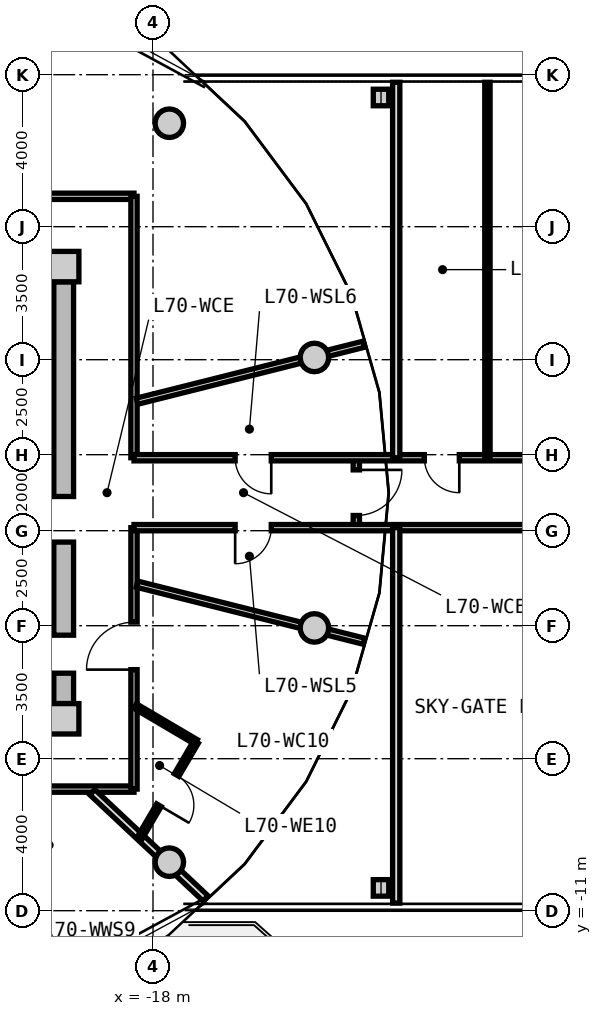
"""IFC4 building model, lengths in metres.
Left out: names, types, materials, properties, quantities, classifications, styles, units other than length and angle.
Written with IfcOpenShell. Run it as: python <this file> out.ifc"""

import sys

from ifc_helpers import new_model, si_unit, direction, frame, frame_2d, origin, origin_2d, place, context, subcontext, project, spatial, rectangle, circle, i_section, extrude, source, transform, mapped, element, fill, save


model = new_model("IFC4")
c1 = context("Model", 3, precision=1e-05, world=origin(), true_north=direction((0.0, 1.0)))
c2 = subcontext(c1, "Body", "Model", "MODEL_VIEW")
j1 = project(units=[si_unit("LENGTHUNIT", "METRE"), si_unit("PLANEANGLEUNIT", "RADIAN")], contexts=[c1])
p1 = place(None, origin())
s1 = spatial("IfcSite", under=j1, at=p1, CompositionType="ELEMENT")
p2 = place(p1, origin())
s2 = spatial("IfcBuilding", under=s1, at=p2, CompositionType="ELEMENT")
p3 = place(p2, frame((0.0, 0.0, 226.1)))
s3 = spatial("IfcBuildingStorey", under=s2, at=p3, CompositionType="ELEMENT", Elevation=226.1)
m1 = source(origin(), c2, "Body", "SweptSolid", [
    extrude(rectangle(XDim=0.8, YDim=0.8, at=origin_2d()), origin(), (0.0, 0.0, 1.0), 3.05),
])
for number, where, z_axis, x_axis in (
    (1, (-20.35, -5.95, 0.0), (0.0, 0.0, 1.0), (1.0, 0.0, 0.0)),
    (2, (-20.35, 5.95, 0.0), (0.0, 0.0, 1.0), (1.0, 0.0, 0.0)),
):
    element("IfcColumn", number, at=place(p3, frame(where, z_axis=z_axis, x_axis=x_axis)), inside=s3, PredefinedType="COLUMN", context=c2, shape_type="MappedRepresentation", body=[
        mapped(m1, transform((0.0, 0.0, 0.0), x_axis=(1.0, 0.0, 0.0), y_axis=(0.0, 1.0, 0.0), z_axis=(0.0, 0.0, 1.0), scale=1.0)),
    ])
m2 = source(origin(), c2, "Body", "SweptSolid", [
    extrude(rectangle(XDim=11.1, YDim=0.52, at=frame_2d((5.55, 0.0))), origin(), (0.0, 0.0, 1.0), 2.76),
])
p4 = place(p3, frame((-20.35, 5.55, 0.0), z_axis=(0.0, 0.0, 1.0), x_axis=(0.0, -1.0, 0.0)))
e3 = element("IfcWall", 3, at=p4, inside=s3, PredefinedType="SHEAR", context=c2, shape_type="MappedRepresentation", body=[
    mapped(m2, transform((0.0, 0.0, 0.0), x_axis=(1.0, 0.0, 0.0), y_axis=(0.0, 1.0, 0.0), z_axis=(0.0, 0.0, 1.0), scale=1.0)),
])
p5 = place(p4, frame((5.65, 0.0, 0.0)))
e4 = element("IfcOpeningElement", 4, at=p5, cuts=e3, PredefinedType="OPENING", context=c2, shape_type="SweptSolid", body=[
    extrude(rectangle(XDim=1.2, YDim=2.15, at=frame_2d((0.6, 1.075))), frame((0.0, 0.27, 0.0), z_axis=(0.0, -1.0, 0.0), x_axis=(1.0, 0.0, 0.0)), (0.0, 0.0, 1.0), 0.54),
])
p6 = place(p4, frame((9.3, 0.0, 0.0)))
e5 = element("IfcOpeningElement", 5, at=p6, cuts=e3, PredefinedType="OPENING", context=c2, shape_type="SweptSolid", body=[
    extrude(rectangle(XDim=1.0, YDim=2.1, at=frame_2d((0.5, 1.05))), frame((0.0, 0.27, 0.0), z_axis=(0.0, -1.0, 0.0), x_axis=(1.0, 0.0, 0.0)), (0.0, 0.0, 1.0), 0.54),
])
m3 = source(origin(), c2, "Body", "SweptSolid", [
    extrude(circle(Radius=0.375, at=origin_2d()), origin(), (0.0, 0.0, 1.0), 3.05),
])
for number, where, z_axis, x_axis in (
    (6, (-13.753, 3.559, 0.0), (0.0, 0.0, 1.0), (1.0, 0.0, 0.0)),
    (7, (-17.57, 9.723, 0.0), (0.0, 0.0, 1.0), (1.0, 0.0, 0.0)),
    (8, (-17.57, -9.723, 0.0), (0.0, 0.0, 1.0), (1.0, 0.0, 0.0)),
    (9, (-13.753, -3.559, 0.0), (0.0, 0.0, 1.0), (1.0, 0.0, 0.0)),
):
    element("IfcColumn", number, at=place(p3, frame(where, z_axis=z_axis, x_axis=x_axis)), inside=s3, PredefinedType="COLUMN", context=c2, shape_type="MappedRepresentation", body=[
        mapped(m3, transform((0.0, 0.0, 0.0), x_axis=(1.0, 0.0, 0.0), y_axis=(0.0, 1.0, 0.0), z_axis=(0.0, 0.0, 1.0), scale=1.0)),
    ])
m4 = source(origin(), c2, "Body", "SweptSolid", [
    extrude(i_section(OverallWidth=0.407, OverallDepth=0.435, WebThickness=0.024, FlangeThickness=0.039, FilletRadius=0.015, at=origin_2d()), origin(), (0.0, 0.0, 1.0), 3.05),
])
for number, where, z_axis, x_axis in (
    (10, (-12.0, -10.4, 0.0), (0.0, 0.0, 1.0), (1.0, 0.0, 0.0)),
    (11, (-12.0, 10.4, 0.0), (0.0, 0.0, 1.0), (1.0, 0.0, 0.0)),
):
    element("IfcColumn", number, at=place(p3, frame(where, z_axis=z_axis, x_axis=x_axis)), inside=s3, PredefinedType="COLUMN", context=c2, shape_type="MappedRepresentation", body=[
        mapped(m4, transform((0.0, 0.0, 0.0), x_axis=(1.0, 0.0, 0.0), y_axis=(0.0, 1.0, 0.0), z_axis=(0.0, 0.0, 1.0), scale=1.0)),
    ])
m5 = source(origin(), c2, "Body", "SweptSolid", [
    extrude(rectangle(XDim=8.58, YDim=0.165, at=frame_2d((4.29, 0.0))), origin(), (0.0, 0.0, 1.0), 2.745),
])
p7 = place(p3, frame((-27.08, 7.8, 0.0), z_axis=(0.0, 0.0, 1.0), x_axis=(1.0, 0.0, 0.0)))
e12 = element("IfcWall", 12, at=p7, inside=s3, PredefinedType="PARTITIONING", context=c2, shape_type="MappedRepresentation", body=[
    mapped(m5, transform((0.0, 0.0, 0.0), x_axis=(1.0, 0.0, 0.0), y_axis=(0.0, 1.0, 0.0), z_axis=(0.0, 0.0, 1.0), scale=1.0)),
])
p8 = place(p7, frame((4.22, 0.0, 0.0)))
e13 = element("IfcOpeningElement", 13, at=p8, cuts=e12, PredefinedType="OPENING", context=c2, shape_type="SweptSolid", body=[
    extrude(rectangle(XDim=1.25, YDim=2.2, at=frame_2d((0.625, 1.1))), frame((0.0, 0.093, 0.0), z_axis=(0.0, -1.0, 0.0), x_axis=(1.0, 0.0, 0.0)), (0.0, 0.0, 1.0), 0.185),
])
m6 = source(origin(), c2, "Body", "SweptSolid", [
    extrude(rectangle(XDim=19.0, YDim=0.165, at=frame_2d((9.5, 0.0))), origin(), (0.0, 0.0, 1.0), 2.745),
])
p9 = place(p3, frame((-18.5, -7.8, 0.0), z_axis=(0.0, 0.0, 1.0), x_axis=(-1.0, 0.0, 0.0)))
e14 = element("IfcWall", 14, at=p9, inside=s3, PredefinedType="PARTITIONING", context=c2, shape_type="MappedRepresentation", body=[
    mapped(m6, transform((0.0, 0.0, 0.0), x_axis=(1.0, 0.0, 0.0), y_axis=(0.0, 1.0, 0.0), z_axis=(0.0, 0.0, 1.0), scale=1.0)),
])
p10 = place(p9, frame((12.373, 0.0, 0.0)))
e15 = element("IfcOpeningElement", 15, at=p10, cuts=e14, PredefinedType="OPENING", context=c2, shape_type="SweptSolid", body=[
    extrude(rectangle(XDim=1.25, YDim=2.2, at=frame_2d((0.625, 1.1))), frame((0.0, 0.093, 0.0), z_axis=(0.0, -1.0, 0.0), x_axis=(1.0, 0.0, 0.0)), (0.0, 0.0, 1.0), 0.185),
])
p11 = place(p9, frame((5.946, 0.0, 0.0)))
e16 = element("IfcOpeningElement", 16, at=p11, cuts=e14, PredefinedType="OPENING", context=c2, shape_type="SweptSolid", body=[
    extrude(rectangle(XDim=0.92, YDim=2.1, at=frame_2d((0.46, 1.05))), frame((0.0, 0.093, 0.0), z_axis=(0.0, -1.0, 0.0), x_axis=(1.0, 0.0, 0.0)), (0.0, 0.0, 1.0), 0.185),
])
p12 = place(p9, frame((2.83, 0.0, 0.0)))
e17 = element("IfcOpeningElement", 17, at=p12, cuts=e14, PredefinedType="OPENING", context=c2, shape_type="SweptSolid", body=[
    extrude(rectangle(XDim=0.92, YDim=2.1, at=frame_2d((0.46, 1.05))), frame((0.0, 0.093, 0.0), z_axis=(0.0, -1.0, 0.0), x_axis=(1.0, 0.0, 0.0)), (0.0, 0.0, 1.0), 0.185),
])
m7 = source(origin(), c2, "Body", "SweptSolid", [
    extrude(rectangle(XDim=6.88, YDim=0.165, at=frame_2d((3.44, 0.0))), origin(), (0.0, 0.0, 1.0), 2.745),
])
p13 = place(p3, frame((-18.5, 7.8, 0.0), z_axis=(0.0, 0.0, 1.0), x_axis=(0.0, -1.0, 0.0)))
e18 = element("IfcWall", 18, at=p13, inside=s3, PredefinedType="PARTITIONING", context=c2, shape_type="MappedRepresentation", body=[
    mapped(m7, transform((0.0, 0.0, 0.0), x_axis=(1.0, 0.0, 0.0), y_axis=(0.0, 1.0, 0.0), z_axis=(0.0, 0.0, 1.0), scale=1.0)),
])
p14 = place(p3, frame((-18.5, -0.92, 0.0), z_axis=(0.0, 0.0, 1.0), x_axis=(0.0, -1.0, 0.0)))
e19 = element("IfcWall", 19, at=p14, inside=s3, PredefinedType="PARTITIONING", context=c2, shape_type="MappedRepresentation", body=[
    mapped(m7, transform((0.0, 0.0, 0.0), x_axis=(1.0, 0.0, 0.0), y_axis=(0.0, 1.0, 0.0), z_axis=(0.0, 0.0, 1.0), scale=1.0)),
])
p15 = place(p14, frame((2.486, 0.0, 0.0)))
e20 = element("IfcOpeningElement", 20, at=p15, cuts=e19, PredefinedType="OPENING", context=c2, shape_type="SweptSolid", body=[
    extrude(rectangle(XDim=1.25, YDim=2.2, at=frame_2d((0.625, 1.1))), frame((0.0, 0.093, 0.0), z_axis=(0.0, -1.0, 0.0), x_axis=(1.0, 0.0, 0.0)), (0.0, 0.0, 1.0), 0.185),
])
m8 = source(origin(), c2, "Body", "SweptSolid", [
    extrude(rectangle(XDim=6.157, YDim=0.165, at=frame_2d((3.079, 0.0))), origin(), (0.0, 0.0, 1.0), 2.345),
])
for number, where, z_axis, x_axis in (
    (21, (-18.42, -2.407, 0.0), (0.0, 0.0, 1.0), (0.97, -0.244, 0.0)),
    (22, (-18.42, 2.407, 0.0), (0.0, 0.0, 1.0), (0.97, 0.244, 0.0)),
):
    element("IfcWall", number, at=place(p3, frame(where, z_axis=z_axis, x_axis=x_axis)), inside=s3, PredefinedType="PARTITIONING", context=c2, shape_type="MappedRepresentation", body=[
        mapped(m8, transform((0.0, 0.0, 0.0), x_axis=(1.0, 0.0, 0.0), y_axis=(0.0, 1.0, 0.0), z_axis=(0.0, 0.0, 1.0), scale=1.0)),
    ])
m9 = source(origin(), c2, "Body", "SweptSolid", [
    extrude(rectangle(XDim=4.089, YDim=0.19, at=frame_2d((2.044, 0.0))), origin(), (0.0, 0.0, 1.0), 2.345),
])
p16 = place(p3, frame((-19.598, -7.88, 0.0), z_axis=(0.0, 0.0, 1.0), x_axis=(0.729401273609, -0.684086092577, 0.0)))
e23 = element("IfcWall", 23, at=p16, inside=s3, PredefinedType="PARTITIONING", context=c2, shape_type="MappedRepresentation", body=[
    mapped(m9, transform((0.0, 0.0, 0.0), x_axis=(1.0, 0.0, 0.0), y_axis=(0.0, 1.0, 0.0), z_axis=(0.0, 0.0, 1.0), scale=1.0)),
])
m10 = source(origin(), c2, "Body", "SweptSolid", [
    extrude(rectangle(XDim=1.859, YDim=0.14, at=frame_2d((0.93, 0.0))), origin(), (0.0, 0.0, 1.0), 2.745),
])
p17 = place(p3, frame((-18.47, -5.615, 0.0), z_axis=(0.0, 0.0, 1.0), x_axis=(0.861555897139, -0.507662718845, 0.0)))
e24 = element("IfcWall", 24, at=p17, inside=s3, PredefinedType="PARTITIONING", context=c2, shape_type="MappedRepresentation", body=[
    mapped(m10, transform((0.0, 0.0, 0.0), x_axis=(1.0, 0.0, 0.0), y_axis=(0.0, 1.0, 0.0), z_axis=(0.0, 0.0, 1.0), scale=1.0)),
])
m11 = source(origin(), c2, "Body", "SweptSolid", [
    extrude(rectangle(XDim=2.939, YDim=0.14, at=frame_2d((1.47, 0.0))), origin(), (0.0, 0.0, 1.0), 2.745),
])
p18 = place(p3, frame((-16.868, -6.559, 0.0), z_axis=(0.0, 0.0, 1.0), x_axis=(-0.505883614636, -0.862601743821, 0.0)))
e25 = element("IfcWall", 25, at=p18, inside=s3, PredefinedType="PARTITIONING", context=c2, shape_type="MappedRepresentation", body=[
    mapped(m11, transform((0.0, 0.0, 0.0), x_axis=(1.0, 0.0, 0.0), y_axis=(0.0, 1.0, 0.0), z_axis=(0.0, 0.0, 1.0), scale=1.0)),
])
p19 = place(p18, frame((1.01, 0.0, 0.0)))
e26 = element("IfcOpeningElement", 26, at=p19, cuts=e25, PredefinedType="OPENING", context=c2, shape_type="SweptSolid", body=[
    extrude(rectangle(XDim=0.92, YDim=2.1, at=frame_2d((0.46, 1.05))), frame((0.0, 0.08, 0.0), z_axis=(0.0, -1.0, 0.0), x_axis=(1.0, 0.0, 0.0)), (0.0, 0.0, 1.0), 0.16),
])
m12 = source(origin(), c2, "Body", "SweptSolid", [
    extrude(rectangle(XDim=1.84, YDim=0.165, at=frame_2d((0.92, 0.0))), origin(), (0.0, 0.0, 1.0), 2.745),
])
p20 = place(p3, frame((-12.65, -0.92, 0.0), z_axis=(0.0, 0.0, 1.0), x_axis=(0.0, 1.0, 0.0)))
e27 = element("IfcWall", 27, at=p20, inside=s3, PredefinedType="PARTITIONING", context=c2, shape_type="MappedRepresentation", body=[
    mapped(m12, transform((0.0, 0.0, 0.0), x_axis=(1.0, 0.0, 0.0), y_axis=(0.0, 1.0, 0.0), z_axis=(0.0, 0.0, 1.0), scale=1.0)),
])
p21 = place(p20, frame((0.32, 0.0, 0.0)))
e28 = element("IfcOpeningElement", 28, at=p21, cuts=e27, PredefinedType="OPENING", context=c2, shape_type="SweptSolid", body=[
    extrude(rectangle(XDim=1.2, YDim=2.15, at=frame_2d((0.6, 1.075))), frame((0.0, 0.093, 0.0), z_axis=(0.0, -1.0, 0.0), x_axis=(1.0, 0.0, 0.0)), (0.0, 0.0, 1.0), 0.185),
])
m13 = source(origin(), c2, "Body", "SweptSolid", [
    extrude(rectangle(XDim=37.0, YDim=0.165, at=frame_2d((18.5, 0.0))), origin(), (0.0, 0.0, 1.0), 2.745),
])
p22 = place(p3, frame((-18.5, -0.92, 0.0), z_axis=(0.0, 0.0, 1.0), x_axis=(1.0, 0.0, 0.0)))
e29 = element("IfcWall", 29, at=p22, inside=s3, PredefinedType="PARTITIONING", context=c2, shape_type="MappedRepresentation", body=[
    mapped(m13, transform((0.0, 0.0, 0.0), x_axis=(1.0, 0.0, 0.0), y_axis=(0.0, 1.0, 0.0), z_axis=(0.0, 0.0, 1.0), scale=1.0)),
])
p23 = place(p22, frame((2.662, 0.0, 0.0)))
e30 = element("IfcOpeningElement", 30, at=p23, cuts=e29, PredefinedType="OPENING", context=c2, shape_type="SweptSolid", body=[
    extrude(rectangle(XDim=0.95, YDim=2.1, at=frame_2d((0.475, 1.05))), frame((0.0, 0.093, 0.0), z_axis=(0.0, -1.0, 0.0), x_axis=(1.0, 0.0, 0.0)), (0.0, 0.0, 1.0), 0.185),
])
p24 = place(p22, frame((33.388, 0.0, 0.0)))
e31 = element("IfcOpeningElement", 31, at=p24, cuts=e29, PredefinedType="OPENING", context=c2, shape_type="SweptSolid", body=[
    extrude(rectangle(XDim=0.95, YDim=2.1, at=frame_2d((0.475, 1.05))), frame((0.0, 0.093, 0.0), z_axis=(0.0, -1.0, 0.0), x_axis=(1.0, 0.0, 0.0)), (0.0, 0.0, 1.0), 0.185),
])
p25 = place(p22, frame((12.71, 0.0, 0.0)))
e32 = element("IfcOpeningElement", 32, at=p25, cuts=e29, PredefinedType="OPENING", context=c2, shape_type="SweptSolid", body=[
    extrude(rectangle(XDim=1.25, YDim=2.2, at=frame_2d((0.625, 1.1))), frame((0.0, 0.093, 0.0), z_axis=(0.0, -1.0, 0.0), x_axis=(1.0, 0.0, 0.0)), (0.0, 0.0, 1.0), 0.185),
])
p26 = place(p22, frame((20.875, 0.0, 0.0)))
e33 = element("IfcOpeningElement", 33, at=p26, cuts=e29, PredefinedType="OPENING", context=c2, shape_type="SweptSolid", body=[
    extrude(rectangle(XDim=1.25, YDim=2.2, at=frame_2d((0.625, 1.1))), frame((0.0, 0.093, 0.0), z_axis=(0.0, -1.0, 0.0), x_axis=(1.0, 0.0, 0.0)), (0.0, 0.0, 1.0), 0.185),
])
p27 = place(p22, frame((26.675, 0.0, 0.0)))
e34 = element("IfcOpeningElement", 34, at=p27, cuts=e29, PredefinedType="OPENING", context=c2, shape_type="SweptSolid", body=[
    extrude(rectangle(XDim=1.25, YDim=2.2, at=frame_2d((0.625, 1.1))), frame((0.0, 0.093, 0.0), z_axis=(0.0, -1.0, 0.0), x_axis=(1.0, 0.0, 0.0)), (0.0, 0.0, 1.0), 0.185),
])
p28 = place(p3, frame((-18.5, 0.92, 0.0), z_axis=(0.0, 0.0, 1.0), x_axis=(1.0, 0.0, 0.0)))
e35 = element("IfcWall", 35, at=p28, inside=s3, PredefinedType="PARTITIONING", context=c2, shape_type="MappedRepresentation", body=[
    mapped(m13, transform((0.0, 0.0, 0.0), x_axis=(1.0, 0.0, 0.0), y_axis=(0.0, 1.0, 0.0), z_axis=(0.0, 0.0, 1.0), scale=1.0)),
])
p29 = place(p28, frame((2.662, 0.0, 0.0)))
e36 = element("IfcOpeningElement", 36, at=p29, cuts=e35, PredefinedType="OPENING", context=c2, shape_type="SweptSolid", body=[
    extrude(rectangle(XDim=0.95, YDim=2.1, at=frame_2d((0.475, 1.05))), frame((0.0, 0.093, 0.0), z_axis=(0.0, -1.0, 0.0), x_axis=(1.0, 0.0, 0.0)), (0.0, 0.0, 1.0), 0.185),
])
p30 = place(p28, frame((33.388, 0.0, 0.0)))
e37 = element("IfcOpeningElement", 37, at=p30, cuts=e35, PredefinedType="OPENING", context=c2, shape_type="SweptSolid", body=[
    extrude(rectangle(XDim=0.95, YDim=2.1, at=frame_2d((0.475, 1.05))), frame((0.0, 0.093, 0.0), z_axis=(0.0, -1.0, 0.0), x_axis=(1.0, 0.0, 0.0)), (0.0, 0.0, 1.0), 0.185),
])
p31 = place(p28, frame((7.64, 0.0, 0.0)))
e38 = element("IfcOpeningElement", 38, at=p31, cuts=e35, PredefinedType="OPENING", context=c2, shape_type="SweptSolid", body=[
    extrude(rectangle(XDim=0.92, YDim=2.1, at=frame_2d((0.46, 1.05))), frame((0.0, 0.093, 0.0), z_axis=(0.0, -1.0, 0.0), x_axis=(1.0, 0.0, 0.0)), (0.0, 0.0, 1.0), 0.185),
])
p32 = place(p28, frame((13.275, 0.0, 0.0)))
e39 = element("IfcOpeningElement", 39, at=p32, cuts=e35, PredefinedType="OPENING", context=c2, shape_type="SweptSolid", body=[
    extrude(rectangle(XDim=1.25, YDim=2.2, at=frame_2d((0.625, 1.1))), frame((0.0, 0.093, 0.0), z_axis=(0.0, -1.0, 0.0), x_axis=(1.0, 0.0, 0.0)), (0.0, 0.0, 1.0), 0.185),
])
p33 = place(p28, frame((20.875, 0.0, 0.0)))
e40 = element("IfcOpeningElement", 40, at=p33, cuts=e35, PredefinedType="OPENING", context=c2, shape_type="SweptSolid", body=[
    extrude(rectangle(XDim=1.25, YDim=2.2, at=frame_2d((0.625, 1.1))), frame((0.0, 0.093, 0.0), z_axis=(0.0, -1.0, 0.0), x_axis=(1.0, 0.0, 0.0)), (0.0, 0.0, 1.0), 0.185),
])
p34 = place(p28, frame((26.675, 0.0, 0.0)))
e41 = element("IfcOpeningElement", 41, at=p34, cuts=e35, PredefinedType="OPENING", context=c2, shape_type="SweptSolid", body=[
    extrude(rectangle(XDim=1.25, YDim=2.2, at=frame_2d((0.625, 1.1))), frame((0.0, 0.093, 0.0), z_axis=(0.0, -1.0, 0.0), x_axis=(1.0, 0.0, 0.0)), (0.0, 0.0, 1.0), 0.185),
])
m14 = source(origin(), c2, "Body", "SweptSolid", [
    extrude(rectangle(XDim=9.88, YDim=0.19, at=frame_2d((4.94, 0.0))), origin(), (0.0, 0.0, 1.0), 2.745),
])
for number, where, z_axis, x_axis in (
    (42, (-11.6, -10.8, 0.0), (0.0, 0.0, 1.0), (0.0, 1.0, 0.0)),
    (43, (-11.6, 0.92, 0.0), (0.0, 0.0, 1.0), (0.0, 1.0, 0.0)),
):
    element("IfcWall", number, at=place(p3, frame(where, z_axis=z_axis, x_axis=x_axis)), inside=s3, PredefinedType="PARTITIONING", context=c2, shape_type="MappedRepresentation", body=[
        mapped(m14, transform((0.0, 0.0, 0.0), x_axis=(1.0, 0.0, 0.0), y_axis=(0.0, 1.0, 0.0), z_axis=(0.0, 0.0, 1.0), scale=1.0)),
    ])
m15 = source(origin(), c2, "Body", "SweptSolid", [
    extrude(rectangle(XDim=9.88, YDim=0.14, at=frame_2d((4.94, 0.0))), origin(), (0.0, 0.0, 1.0), 2.745),
])
p35 = place(p3, frame((-9.2, 0.92, 0.0), z_axis=(0.0, 0.0, 1.0), x_axis=(0.0, 1.0, 0.0)))
e44 = element("IfcWall", 44, at=p35, inside=s3, PredefinedType="PARTITIONING", context=c2, shape_type="MappedRepresentation", body=[
    mapped(m15, transform((0.0, 0.0, 0.0), x_axis=(1.0, 0.0, 0.0), y_axis=(0.0, 1.0, 0.0), z_axis=(0.0, 0.0, 1.0), scale=1.0)),
])
m16 = source(origin(), c2, "Body", "SweptSolid", [
    extrude(rectangle(XDim=1.2, YDim=2.15, at=frame_2d((0.6, 1.075))), frame((0.0, 0.025, 0.0), z_axis=(0.0, -1.0, 0.0), x_axis=(1.0, 0.0, 0.0)), (0.0, 0.0, 1.0), 0.05),
])
p36 = place(p5, frame((1.2, 0.0, 0.0), z_axis=(0.0, 0.0, 1.0), x_axis=(-1.0, 0.0, 0.0)))
e45 = element("IfcDoor", 45, at=p36, inside=s3, OperationType="SINGLE_SWING_RIGHT", PredefinedType="DOOR", context=c2, shape_type="MappedRepresentation", body=[
    mapped(m16, transform((0.0, 0.0, 0.0), x_axis=(1.0, 0.0, 0.0), y_axis=(0.0, 1.0, 0.0), z_axis=(0.0, 0.0, 1.0), scale=1.0)),
])
fill(e4, e45)
m17 = source(origin(), c2, "Body", "SweptSolid", [
    extrude(rectangle(XDim=1.0, YDim=2.1, at=frame_2d((0.5, 1.05))), frame((0.0, 0.025, 0.0), z_axis=(0.0, -1.0, 0.0), x_axis=(1.0, 0.0, 0.0)), (0.0, 0.0, 1.0), 0.05),
])
p37 = place(p6, frame((1.0, 0.0, 0.0), z_axis=(0.0, 0.0, 1.0), x_axis=(-1.0, 0.0, 0.0)))
e46 = element("IfcDoor", 46, at=p37, inside=s3, OperationType="SINGLE_SWING_RIGHT", PredefinedType="DOOR", context=c2, shape_type="MappedRepresentation", body=[
    mapped(m17, transform((0.0, 0.0, 0.0), x_axis=(1.0, 0.0, 0.0), y_axis=(0.0, 1.0, 0.0), z_axis=(0.0, 0.0, 1.0), scale=1.0)),
])
fill(e5, e46)
m18 = source(origin(), c2, "Body", "SweptSolid", [
    extrude(rectangle(XDim=0.95, YDim=2.1, at=frame_2d((0.475, 1.05))), frame((0.0, 0.025, 0.0), z_axis=(0.0, -1.0, 0.0), x_axis=(1.0, 0.0, 0.0)), (0.0, 0.0, 1.0), 0.05),
])
p38 = place(p23, frame((0.95, 0.0, 0.0), z_axis=(0.0, 0.0, 1.0), x_axis=(-1.0, 0.0, 0.0)))
e47 = element("IfcDoor", 47, at=p38, inside=s3, OperationType="SINGLE_SWING_RIGHT", PredefinedType="DOOR", context=c2, shape_type="MappedRepresentation", body=[
    mapped(m18, transform((0.0, 0.0, 0.0), x_axis=(1.0, 0.0, 0.0), y_axis=(0.0, 1.0, 0.0), z_axis=(0.0, 0.0, 1.0), scale=1.0)),
])
fill(e30, e47)
p39 = place(p29, frame((0.95, 0.0, 0.0), z_axis=(0.0, 0.0, 1.0), x_axis=(-1.0, 0.0, 0.0)))
e48 = element("IfcDoor", 48, at=p39, inside=s3, OperationType="SINGLE_SWING_LEFT", PredefinedType="DOOR", context=c2, shape_type="MappedRepresentation", body=[
    mapped(m18, transform((0.0, 0.0, 0.0), x_axis=(1.0, 0.0, 0.0), y_axis=(0.0, 1.0, 0.0), z_axis=(0.0, 0.0, 1.0), scale=1.0)),
])
fill(e36, e48)
m19 = source(origin(), c2, "Body", "SweptSolid", [
    extrude(rectangle(XDim=1.25, YDim=2.2, at=frame_2d((0.625, 1.1))), frame((0.0, 0.025, 0.0), z_axis=(0.0, -1.0, 0.0), x_axis=(1.0, 0.0, 0.0)), (0.0, 0.0, 1.0), 0.05),
])
p40 = place(p15, frame((1.25, 0.0, 0.0), z_axis=(0.0, 0.0, 1.0), x_axis=(-1.0, 0.0, 0.0)))
e49 = element("IfcDoor", 49, at=p40, inside=s3, OperationType="SINGLE_SWING_LEFT", PredefinedType="DOOR", context=c2, shape_type="MappedRepresentation", body=[
    mapped(m19, transform((0.0, 0.0, 0.0), x_axis=(1.0, 0.0, 0.0), y_axis=(0.0, 1.0, 0.0), z_axis=(0.0, 0.0, 1.0), scale=1.0)),
])
fill(e20, e49)
m20 = source(origin(), c2, "Body", "SweptSolid", [
    extrude(rectangle(XDim=0.92, YDim=2.1, at=frame_2d((0.46, 1.05))), frame((0.0, 0.025, 0.0), z_axis=(0.0, -1.0, 0.0), x_axis=(1.0, 0.0, 0.0)), (0.0, 0.0, 1.0), 0.05),
])
p41 = place(p19, origin())
e50 = element("IfcDoor", 50, at=p41, inside=s3, OperationType="SINGLE_SWING_RIGHT", PredefinedType="DOOR", context=c2, shape_type="MappedRepresentation", body=[
    mapped(m20, transform((0.0, 0.0, 0.0), x_axis=(1.0, 0.0, 0.0), y_axis=(0.0, 1.0, 0.0), z_axis=(0.0, 0.0, 1.0), scale=1.0)),
])
fill(e26, e50)
p42 = place(p21, frame((1.2, 0.0, 0.0), z_axis=(0.0, 0.0, 1.0), x_axis=(-1.0, 0.0, 0.0)))
e51 = element("IfcDoor", 51, at=p42, inside=s3, OperationType="SINGLE_SWING_LEFT", PredefinedType="DOOR", context=c2, shape_type="MappedRepresentation", body=[
    mapped(m16, transform((0.0, 0.0, 0.0), x_axis=(1.0, 0.0, 0.0), y_axis=(0.0, 1.0, 0.0), z_axis=(0.0, 0.0, 1.0), scale=1.0)),
])
fill(e28, e51)
p43 = place(p31, frame((0.92, 0.0, 0.0), z_axis=(0.0, 0.0, 1.0), x_axis=(-1.0, 0.0, 0.0)))
e52 = element("IfcDoor", 52, at=p43, inside=s3, OperationType="SINGLE_SWING_LEFT", PredefinedType="DOOR", context=c2, shape_type="MappedRepresentation", body=[
    mapped(m20, transform((0.0, 0.0, 0.0), x_axis=(1.0, 0.0, 0.0), y_axis=(0.0, 1.0, 0.0), z_axis=(0.0, 0.0, 1.0), scale=1.0)),
])
fill(e38, e52)
save(model, sys.argv[1])
